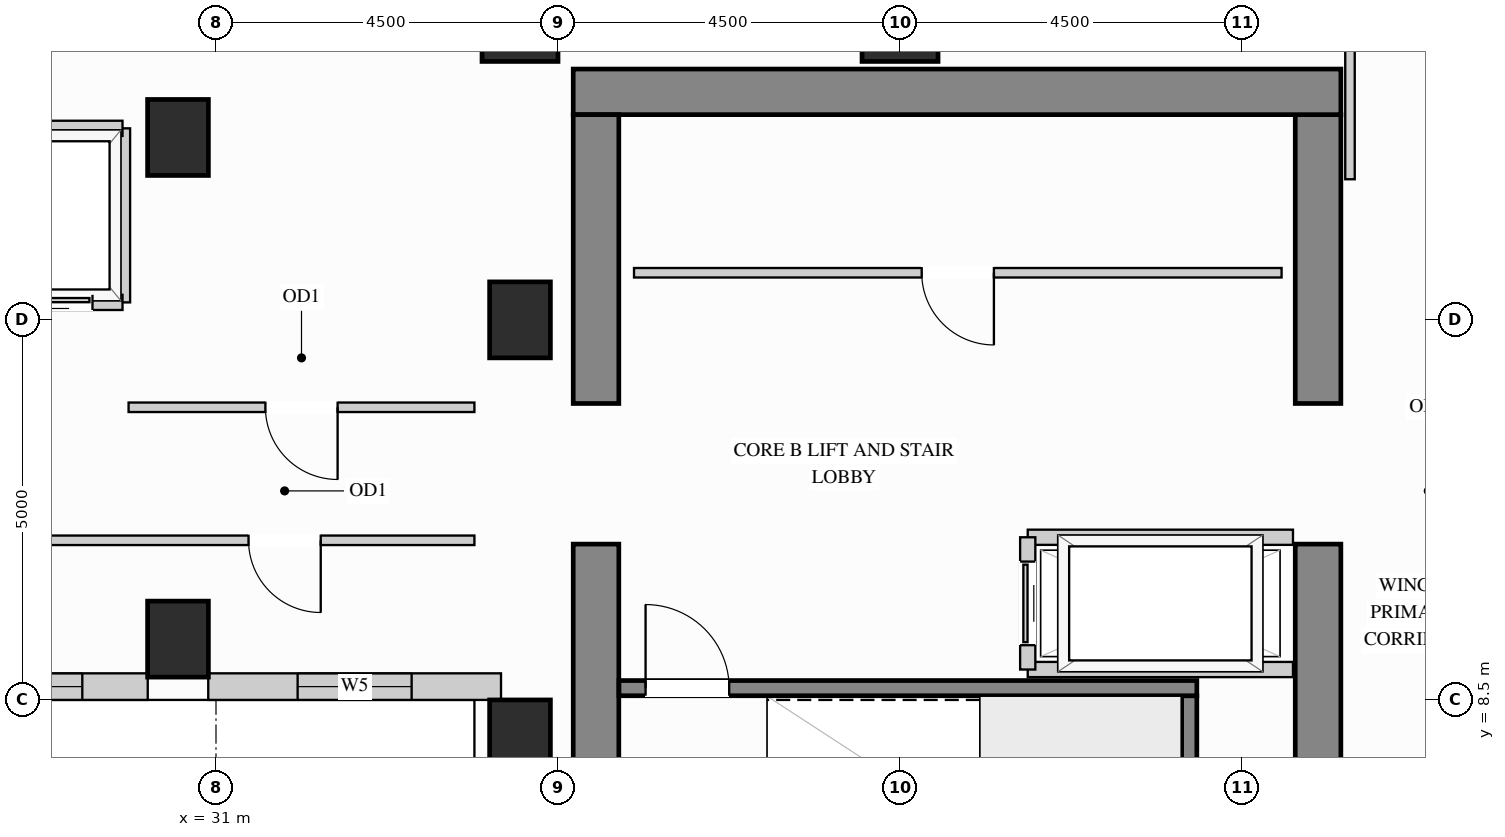
"""IFC4 building model, lengths in metres.
Left out: names, types, materials, properties, quantities, classifications, styles, units other than length and angle.
Written with IfcOpenShell. Run it as: python <this file> out.ifc"""

import sys

from ifc_helpers import new_model, si_unit, direction, frame, frame_2d, origin, origin_2d, place, context, subcontext, project, spatial, rectangle, extrude, source, transform, mapped, element, fill, save


model = new_model("IFC4")
c1 = context("Model", 3, precision=1e-05, world=origin(), true_north=direction((0.0, 1.0)))
c2 = subcontext(c1, "Body", "Model", "MODEL_VIEW")
j1 = project(units=[si_unit("LENGTHUNIT", "METRE"), si_unit("PLANEANGLEUNIT", "RADIAN")], contexts=[c1])
p1 = place(None, origin())
s1 = spatial("IfcSite", under=j1, at=p1, CompositionType="ELEMENT")
p2 = place(p1, origin())
s2 = spatial("IfcBuilding", under=s1, at=p2, CompositionType="ELEMENT")
p3 = place(p2, frame((0.0, 0.0, 157.5)))
s3 = spatial("IfcBuildingStorey", under=s2, at=p3, CompositionType="ELEMENT", Elevation=157.5)
m1 = source(origin(), c2, "Body", "SweptSolid", [
    extrude(rectangle(XDim=0.8, YDim=1.0, at=origin_2d()), origin(), (0.0, 0.0, 1.0), 3.4),
])
for number, where, z_axis, x_axis in (
    (1, (35.0, 13.5, 0.0), (0.0, 0.0, 1.0), (1.0, 0.0, 0.0)),
    (2, (35.0, 8.0, 0.0), (0.0, 0.0, 1.0), (1.0, 0.0, 0.0)),
    (3, (30.5, 15.9, 0.0), (0.0, 0.0, 1.0), (1.0, 0.0, 0.0)),
    (4, (30.5, 9.3, 0.0), (0.0, 0.0, 1.0), (1.0, 0.0, 0.0)),
):
    element("IfcColumn", number, at=place(p3, frame(where, z_axis=z_axis, x_axis=x_axis)), inside=s3, PredefinedType="COLUMN", context=c2, shape_type="MappedRepresentation", body=[
        mapped(m1, transform((0.0, 0.0, 0.0), x_axis=(1.0, 0.0, 0.0), y_axis=(0.0, 1.0, 0.0), z_axis=(0.0, 0.0, 1.0))),
    ])
m2 = source(origin(), c2, "Body", "SweptSolid", [
    extrude(rectangle(XDim=1.0, YDim=1.0, at=origin_2d()), origin(), (0.0, 0.0, 1.0), 3.4),
])
for number, where, z_axis, x_axis in (
    (5, (35.0, 17.4, 0.0), (0.0, 0.0, 1.0), (1.0, 0.0, 0.0)),
    (6, (40.0, 17.4, 0.0), (0.0, 0.0, 1.0), (1.0, 0.0, 0.0)),
):
    element("IfcColumn", number, at=place(p3, frame(where, z_axis=z_axis, x_axis=x_axis)), inside=s3, PredefinedType="COLUMN", context=c2, shape_type="MappedRepresentation", body=[
        mapped(m2, transform((0.0, 0.0, 0.0), x_axis=(1.0, 0.0, 0.0), y_axis=(0.0, 1.0, 0.0), z_axis=(0.0, 0.0, 1.0))),
    ])
m3 = source(origin(), c2, "Body", "SweptSolid", [
    extrude(rectangle(XDim=5.75, YDim=0.6, at=frame_2d((2.875, 0.0))), origin(), (0.0, 0.0, 1.0), 3.4),
])
p4 = place(p3, frame((45.5, 4.8, 0.0), z_axis=(0.0, 0.0, 1.0), x_axis=(0.0, 1.0, 0.0)))
e7 = element("IfcWall", 7, at=p4, inside=s3, PredefinedType="SHEAR", context=c2, shape_type="MappedRepresentation", body=[
    mapped(m3, transform((0.0, 0.0, 0.0), x_axis=(1.0, 0.0, 0.0), y_axis=(0.0, 1.0, 0.0), z_axis=(0.0, 0.0, 1.0))),
])
m4 = source(origin(), c2, "Body", "SweptSolid", [
    extrude(rectangle(XDim=3.8, YDim=0.6, at=frame_2d((1.9, 0.0))), origin(), (0.0, 0.0, 1.0), 3.4),
])
p5 = place(p3, frame((45.5, 12.4, 0.0), z_axis=(0.0, 0.0, 1.0), x_axis=(0.0, 1.0, 0.0)))
e8 = element("IfcWall", 8, at=p5, inside=s3, PredefinedType="SHEAR", context=c2, shape_type="MappedRepresentation", body=[
    mapped(m4, transform((0.0, 0.0, 0.0), x_axis=(1.0, 0.0, 0.0), y_axis=(0.0, 1.0, 0.0), z_axis=(0.0, 0.0, 1.0))),
])
m5 = source(origin(), c2, "Body", "SweptSolid", [
    extrude(rectangle(XDim=10.1, YDim=0.6, at=frame_2d((5.05, 0.0))), origin(), (0.0, 0.0, 1.0), 3.4),
])
p6 = place(p3, frame((35.7, 16.5, 0.0), z_axis=(0.0, 0.0, 1.0), x_axis=(1.0, 0.0, 0.0)))
e9 = element("IfcWall", 9, at=p6, inside=s3, PredefinedType="SHEAR", context=c2, shape_type="MappedRepresentation", body=[
    mapped(m5, transform((0.0, 0.0, 0.0), x_axis=(1.0, 0.0, 0.0), y_axis=(0.0, 1.0, 0.0), z_axis=(0.0, 0.0, 1.0))),
])
p7 = place(p3, frame((36.0, 4.8, 0.0), z_axis=(0.0, 0.0, 1.0), x_axis=(0.0, 1.0, 0.0)))
e10 = element("IfcWall", 10, at=p7, inside=s3, PredefinedType="SHEAR", context=c2, shape_type="MappedRepresentation", body=[
    mapped(m3, transform((0.0, 0.0, 0.0), x_axis=(1.0, 0.0, 0.0), y_axis=(0.0, 1.0, 0.0), z_axis=(0.0, 0.0, 1.0))),
])
p8 = place(p3, frame((36.0, 12.4, 0.0), z_axis=(0.0, 0.0, 1.0), x_axis=(0.0, 1.0, 0.0)))
e11 = element("IfcWall", 11, at=p8, inside=s3, PredefinedType="SHEAR", context=c2, shape_type="MappedRepresentation", body=[
    mapped(m4, transform((0.0, 0.0, 0.0), x_axis=(1.0, 0.0, 0.0), y_axis=(0.0, 1.0, 0.0), z_axis=(0.0, 0.0, 1.0))),
])
p9 = place(p3, frame((23.798, 8.675, 0.0), z_axis=(0.0, 0.0, 1.0), x_axis=(1.0, 0.0, 0.0)))
e12 = element("IfcWall", 12, at=p9, inside=s3, PredefinedType="SOLIDWALL", context=c2, shape_type="SweptSolid", body=[
    extrude(rectangle(XDim=6.304, YDim=0.35, at=frame_2d((3.152, 0.0))), origin(), (0.0, 0.0, 1.0), 3.385),
])
p10 = place(p9, frame((0.861, 0.0, 0.78)))
e13 = element("IfcOpeningElement", 13, at=p10, cuts=e12, PredefinedType="OPENING", context=c2, shape_type="SweptSolid", body=[
    extrude(rectangle(XDim=1.5, YDim=2.0, at=frame_2d((0.75, 1.0))), frame((0.0, 0.185, 0.0), z_axis=(0.0, -1.0, 0.0), x_axis=(1.0, 0.0, 0.0)), (0.0, 0.0, 1.0), 0.37),
])
p11 = place(p9, frame((3.943, 0.0, 0.78)))
e14 = element("IfcOpeningElement", 14, at=p11, cuts=e12, PredefinedType="OPENING", context=c2, shape_type="SweptSolid", body=[
    extrude(rectangle(XDim=1.5, YDim=2.0, at=frame_2d((0.75, 1.0))), frame((0.0, 0.185, 0.0), z_axis=(0.0, -1.0, 0.0), x_axis=(1.0, 0.0, 0.0)), (0.0, 0.0, 1.0), 0.37),
])
p12 = place(p3, frame((30.898, 8.675, 0.0), z_axis=(0.0, 0.0, 1.0), x_axis=(1.0, 0.0, 0.0)))
e15 = element("IfcWall", 15, at=p12, inside=s3, PredefinedType="SOLIDWALL", context=c2, shape_type="SweptSolid", body=[
    extrude(rectangle(XDim=3.852, YDim=0.35, at=frame_2d((1.926, 0.0))), origin(), (0.0, 0.0, 1.0), 3.385),
])
p13 = place(p12, frame((1.176, 0.0, 0.78)))
e16 = element("IfcOpeningElement", 16, at=p13, cuts=e15, PredefinedType="OPENING", context=c2, shape_type="SweptSolid", body=[
    extrude(rectangle(XDim=1.5, YDim=2.0, at=frame_2d((0.75, 1.0))), frame((0.0, 0.185, 0.0), z_axis=(0.0, -1.0, 0.0), x_axis=(1.0, 0.0, 0.0)), (0.0, 0.0, 1.0), 0.37),
])
p14 = place(p3, frame((36.5, 14.12, 0.0), z_axis=(0.0, 0.0, 1.0), x_axis=(1.0, 0.0, 0.0)))
e17 = element("IfcWall", 17, at=p14, inside=s3, PredefinedType="PARTITIONING", context=c2, shape_type="SweptSolid", body=[
    extrude(rectangle(XDim=8.52, YDim=0.125, at=frame_2d((4.26, 0.0))), origin(), (0.0, 0.0, 1.0), 3.385),
])
p15 = place(p14, frame((3.785, 0.0, 0.0)))
e18 = element("IfcOpeningElement", 18, at=p15, cuts=e17, PredefinedType="OPENING", context=c2, shape_type="SweptSolid", body=[
    extrude(rectangle(XDim=0.95, YDim=2.15, at=frame_2d((0.475, 1.075))), frame((0.0, 0.073, 0.0), z_axis=(0.0, -1.0, 0.0), x_axis=(1.0, 0.0, 0.0)), (0.0, 0.0, 1.0), 0.145),
])
m6 = source(origin(), c2, "Body", "SweptSolid", [
    extrude(rectangle(XDim=2.298, YDim=0.125, at=frame_2d((1.149, 0.0))), origin(), (0.0, 0.0, 1.0), 3.385),
])
p16 = place(p3, frame((45.92, 15.35, 0.0), z_axis=(0.0, 0.0, 1.0), x_axis=(0.0, 1.0, 0.0)))
e19 = element("IfcWall", 19, at=p16, inside=s3, PredefinedType="PARTITIONING", context=c2, shape_type="MappedRepresentation", body=[
    mapped(m6, transform((0.0, 0.0, 0.0), x_axis=(1.0, 0.0, 0.0), y_axis=(0.0, 1.0, 0.0), z_axis=(0.0, 0.0, 1.0))),
])
p17 = place(p3, frame((29.85, 12.35, 0.0), z_axis=(0.0, 0.0, 1.0), x_axis=(1.0, 0.0, 0.0)))
e20 = element("IfcWall", 20, at=p17, inside=s3, PredefinedType="PARTITIONING", context=c2, shape_type="SweptSolid", body=[
    extrude(rectangle(XDim=4.55, YDim=0.125, at=frame_2d((2.275, 0.0))), origin(), (0.0, 0.0, 1.0), 3.385),
])
p18 = place(p17, frame((1.8, 0.0, 0.0)))
e21 = element("IfcOpeningElement", 21, at=p18, cuts=e20, PredefinedType="OPENING", context=c2, shape_type="SweptSolid", body=[
    extrude(rectangle(XDim=0.95, YDim=2.15, at=frame_2d((0.475, 1.075))), frame((0.0, 0.073, 0.0), z_axis=(0.0, -1.0, 0.0), x_axis=(1.0, 0.0, 0.0)), (0.0, 0.0, 1.0), 0.145),
])
p19 = place(p3, frame((26.95, 10.6, 0.0), z_axis=(0.0, 0.0, 1.0), x_axis=(1.0, 0.0, 0.0)))
e22 = element("IfcWall", 22, at=p19, inside=s3, PredefinedType="PARTITIONING", context=c2, shape_type="SweptSolid", body=[
    extrude(rectangle(XDim=7.45, YDim=0.125, at=frame_2d((3.725, 0.0))), origin(), (0.0, 0.0, 1.0), 3.385),
])
p20 = place(p19, frame((4.478, 0.0, 0.0)))
e23 = element("IfcOpeningElement", 23, at=p20, cuts=e22, PredefinedType="OPENING", context=c2, shape_type="SweptSolid", body=[
    extrude(rectangle(XDim=0.95, YDim=2.15, at=frame_2d((0.475, 1.075))), frame((0.0, 0.073, 0.0), z_axis=(0.0, -1.0, 0.0), x_axis=(1.0, 0.0, 0.0)), (0.0, 0.0, 1.0), 0.145),
])
m7 = source(origin(), c2, "Body", "SweptSolid", [
    extrude(rectangle(XDim=2.29, YDim=0.2, at=frame_2d((1.145, 0.0))), origin(), (0.0, 0.0, 1.0), 3.385),
])
p21 = place(p3, frame((29.77, 13.73, 0.0), z_axis=(0.0, 0.0, 1.0), x_axis=(0.0, 1.0, 0.0)))
e24 = element("IfcWall", 24, at=p21, inside=s3, PredefinedType="PARTITIONING", context=c2, shape_type="MappedRepresentation", body=[
    mapped(m7, transform((0.0, 0.0, 0.0), x_axis=(1.0, 0.0, 0.0), y_axis=(0.0, 1.0, 0.0), z_axis=(0.0, 0.0, 1.0))),
])
m8 = source(origin(), c2, "Body", "SweptSolid", [
    extrude(rectangle(XDim=1.89, YDim=0.2, at=frame_2d((0.945, 0.0))), origin(), (0.0, 0.0, 1.0), 2.773),
])
p22 = place(p3, frame((27.88, 16.02, 0.0), z_axis=(0.0, 0.0, 1.0), x_axis=(1.0, 0.0, 0.0)))
e25 = element("IfcWall", 25, at=p22, inside=s3, PredefinedType="PARTITIONING", context=c2, shape_type="MappedRepresentation", body=[
    mapped(m8, transform((0.0, 0.0, 0.0), x_axis=(1.0, 0.0, 0.0), y_axis=(0.0, 1.0, 0.0), z_axis=(0.0, 0.0, 1.0))),
])
p23 = place(p3, frame((27.88, 13.73, 0.0), z_axis=(0.0, 0.0, 1.0), x_axis=(1.0, 0.0, 0.0)))
e26 = element("IfcWall", 26, at=p23, inside=s3, PredefinedType="PARTITIONING", context=c2, shape_type="SweptSolid", body=[
    extrude(rectangle(XDim=1.89, YDim=0.2, at=frame_2d((0.945, 0.0))), origin(), (0.0, 0.0, 1.0), 2.466),
])
p24 = place(p23, frame((0.395, 0.0, 0.0)))
e27 = element("IfcOpeningElement", 27, at=p24, cuts=e26, PredefinedType="OPENING", context=c2, shape_type="SweptSolid", body=[
    extrude(rectangle(XDim=1.1, YDim=2.2, at=frame_2d((0.55, 1.1))), frame((0.0, 0.11, 0.0), z_axis=(0.0, -1.0, 0.0), x_axis=(1.0, 0.0, 0.0)), (0.0, 0.0, 1.0), 0.22),
])
m9 = source(origin(), c2, "Body", "SweptSolid", [
    extrude(rectangle(XDim=3.49, YDim=0.2, at=frame_2d((1.745, 0.0))), origin(), (0.0, 0.0, 1.0), 3.385),
])
for number, where, z_axis, x_axis in (
    (28, (41.68, 10.64, 0.0), (0.0, 0.0, 1.0), (1.0, 0.0, 0.0)),
    (29, (41.68, 8.9, 0.0), (0.0, 0.0, 1.0), (1.0, 0.0, 0.0)),
):
    element("IfcWall", number, at=place(p3, frame(where, z_axis=z_axis, x_axis=x_axis)), inside=s3, PredefinedType="PARTITIONING", context=c2, shape_type="MappedRepresentation", body=[
        mapped(m9, transform((0.0, 0.0, 0.0), x_axis=(1.0, 0.0, 0.0), y_axis=(0.0, 1.0, 0.0), z_axis=(0.0, 0.0, 1.0))),
    ])
p25 = place(p3, frame((41.68, 8.9, 0.0), z_axis=(0.0, 0.0, 1.0), x_axis=(0.0, 1.0, 0.0)))
e30 = element("IfcWall", 30, at=p25, inside=s3, PredefinedType="PARTITIONING", context=c2, shape_type="SweptSolid", body=[
    extrude(rectangle(XDim=1.74, YDim=0.2, at=frame_2d((0.87, 0.0))), origin(), (0.0, 0.0, 1.0), 3.385),
])
p26 = place(p25, frame((0.32, 0.0, 0.0)))
e31 = element("IfcOpeningElement", 31, at=p26, cuts=e30, PredefinedType="OPENING", context=c2, shape_type="SweptSolid", body=[
    extrude(rectangle(XDim=1.1, YDim=2.2, at=frame_2d((0.55, 1.1))), frame((0.0, 0.11, 0.0), z_axis=(0.0, -1.0, 0.0), x_axis=(1.0, 0.0, 0.0)), (0.0, 0.0, 1.0), 0.22),
])
m10 = source(origin(), c2, "Body", "SweptSolid", [
    extrude(rectangle(XDim=3.753, YDim=0.2, at=frame_2d((1.876, 0.0))), origin(), (0.0, 0.0, 1.0), 3.4),
])
p27 = place(p3, frame((43.805, 4.802, 0.0), z_axis=(0.0, 0.0, 1.0), x_axis=(0.0, 1.0, 0.0)))
e32 = element("IfcWall", 32, at=p27, inside=s3, PredefinedType="SHEAR", context=c2, shape_type="MappedRepresentation", body=[
    mapped(m10, transform((0.0, 0.0, 0.0), x_axis=(1.0, 0.0, 0.0), y_axis=(0.0, 1.0, 0.0), z_axis=(0.0, 0.0, 1.0))),
])
p28 = place(p3, frame((36.302, 8.655, 0.0), z_axis=(0.0, 0.0, 1.0), x_axis=(1.0, 0.0, 0.0)))
e33 = element("IfcWall", 33, at=p28, inside=s3, PredefinedType="SHEAR", context=c2, shape_type="SweptSolid", body=[
    extrude(rectangle(XDim=7.603, YDim=0.2, at=frame_2d((3.802, 0.0))), origin(), (0.0, 0.0, 1.0), 3.4),
])
p29 = place(p28, frame((0.35, 0.0, 0.0)))
e34 = element("IfcOpeningElement", 34, at=p29, cuts=e33, PredefinedType="OPENING", context=c2, shape_type="SweptSolid", body=[
    extrude(rectangle(XDim=1.1, YDim=2.15, at=frame_2d((0.55, 1.075))), frame((0.0, 0.11, 0.0), z_axis=(0.0, -1.0, 0.0), x_axis=(1.0, 0.0, 0.0)), (0.0, 0.0, 1.0), 0.22),
])
m11 = source(origin(), c2, "Body", "SweptSolid", [
    extrude(rectangle(XDim=1.1, YDim=2.2, at=frame_2d((0.55, 1.1))), frame((0.0, 0.025, 0.0), z_axis=(0.0, -1.0, 0.0), x_axis=(1.0, 0.0, 0.0)), (0.0, 0.0, 1.0), 0.05),
])
p30 = place(p24, origin())
e35 = element("IfcDoor", 35, at=p30, inside=s3, OperationType="SLIDING_TO_LEFT", PredefinedType="DOOR", context=c2, shape_type="MappedRepresentation", body=[
    mapped(m11, transform((0.0, 0.0, 0.0), x_axis=(1.0, 0.0, 0.0), y_axis=(0.0, 1.0, 0.0), z_axis=(0.0, 0.0, 1.0))),
])
fill(e27, e35)
p31 = place(p26, origin())
e36 = element("IfcDoor", 36, at=p31, inside=s3, OperationType="SLIDING_TO_LEFT", PredefinedType="DOOR", context=c2, shape_type="MappedRepresentation", body=[
    mapped(m11, transform((0.0, 0.0, 0.0), x_axis=(1.0, 0.0, 0.0), y_axis=(0.0, 1.0, 0.0), z_axis=(0.0, 0.0, 1.0))),
])
fill(e31, e36)
m12 = source(origin(), c2, "Body", "SweptSolid", [
    extrude(rectangle(XDim=0.95, YDim=2.15, at=frame_2d((0.475, 1.075))), frame((0.0, 0.025, 0.0), z_axis=(0.0, -1.0, 0.0), x_axis=(1.0, 0.0, 0.0)), (0.0, 0.0, 1.0), 0.05),
])
p32 = place(p15, origin())
e37 = element("IfcDoor", 37, at=p32, inside=s3, OperationType="SINGLE_SWING_RIGHT", PredefinedType="DOOR", context=c2, shape_type="MappedRepresentation", body=[
    mapped(m12, transform((0.0, 0.0, 0.0), x_axis=(1.0, 0.0, 0.0), y_axis=(0.0, 1.0, 0.0), z_axis=(0.0, 0.0, 1.0))),
])
fill(e18, e37)
p33 = place(p18, origin())
e38 = element("IfcDoor", 38, at=p33, inside=s3, OperationType="SINGLE_SWING_RIGHT", PredefinedType="DOOR", context=c2, shape_type="MappedRepresentation", body=[
    mapped(m12, transform((0.0, 0.0, 0.0), x_axis=(1.0, 0.0, 0.0), y_axis=(0.0, 1.0, 0.0), z_axis=(0.0, 0.0, 1.0))),
])
fill(e21, e38)
p34 = place(p20, origin())
e39 = element("IfcDoor", 39, at=p34, inside=s3, OperationType="SINGLE_SWING_RIGHT", PredefinedType="DOOR", context=c2, shape_type="MappedRepresentation", body=[
    mapped(m12, transform((0.0, 0.0, 0.0), x_axis=(1.0, 0.0, 0.0), y_axis=(0.0, 1.0, 0.0), z_axis=(0.0, 0.0, 1.0))),
])
fill(e23, e39)
m13 = source(origin(), c2, "Body", "SweptSolid", [
    extrude(rectangle(XDim=1.1, YDim=2.15, at=frame_2d((0.55, 1.075))), frame((0.0, 0.025, 0.0), z_axis=(0.0, -1.0, 0.0), x_axis=(1.0, 0.0, 0.0)), (0.0, 0.0, 1.0), 0.05),
])
p35 = place(p29, origin())
e40 = element("IfcDoor", 40, at=p35, inside=s3, OperationType="SINGLE_SWING_LEFT", PredefinedType="DOOR", context=c2, shape_type="MappedRepresentation", body=[
    mapped(m13, transform((0.0, 0.0, 0.0), x_axis=(1.0, 0.0, 0.0), y_axis=(0.0, 1.0, 0.0), z_axis=(0.0, 0.0, 1.0))),
])
fill(e34, e40)
m14 = source(origin(), c2, "Body", "SweptSolid", [
    extrude(rectangle(XDim=1.5, YDim=2.0, at=frame_2d((0.75, 1.0))), frame((0.0, 0.03, 0.0), z_axis=(0.0, -1.0, 0.0), x_axis=(1.0, 0.0, 0.0)), (0.0, 0.0, 1.0), 0.06),
])
p36 = place(p11, origin())
e41 = element("IfcWindow", 41, at=p36, inside=s3, PartitioningType="SINGLE_PANEL", PredefinedType="WINDOW", context=c2, shape_type="MappedRepresentation", body=[
    mapped(m14, transform((0.0, 0.0, 0.0), x_axis=(1.0, 0.0, 0.0), y_axis=(0.0, 1.0, 0.0), z_axis=(0.0, 0.0, 1.0))),
])
fill(e14, e41)
p37 = place(p13, origin())
e42 = element("IfcWindow", 42, at=p37, inside=s3, PartitioningType="SINGLE_PANEL", PredefinedType="WINDOW", context=c2, shape_type="MappedRepresentation", body=[
    mapped(m14, transform((0.0, 0.0, 0.0), x_axis=(1.0, 0.0, 0.0), y_axis=(0.0, 1.0, 0.0), z_axis=(0.0, 0.0, 1.0))),
])
fill(e16, e42)
save(model, sys.argv[1])
